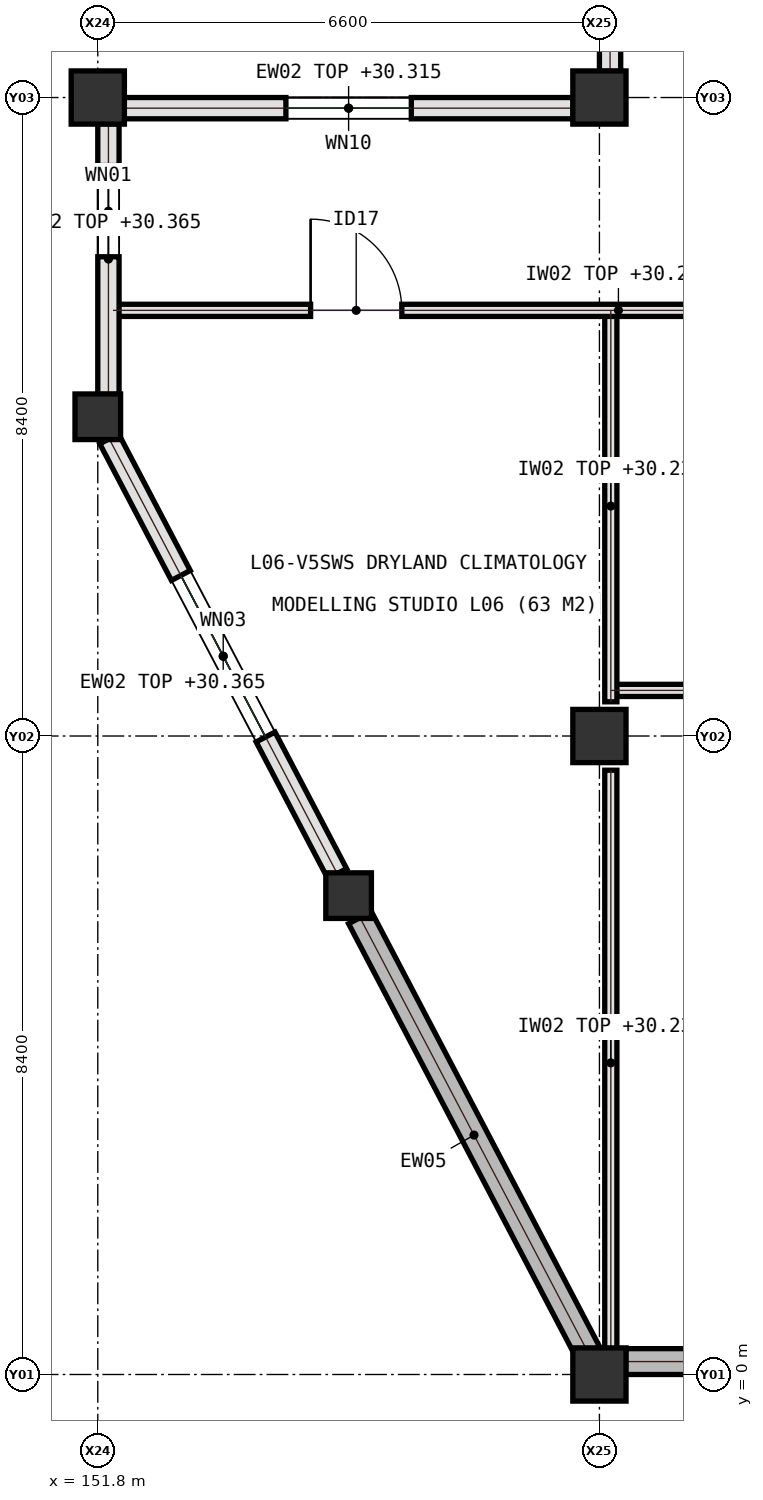
"""IFC4 building model, lengths in metres.
Left out: names, types, materials, properties, quantities, classifications, styles, units other than length and angle.
Written with IfcOpenShell. Run it as: python <this file> out.ifc"""

import sys

from ifc_helpers import new_model, si_unit, direction, frame, frame_2d, origin, origin_2d, place, context, subcontext, project, spatial, rectangle, extrude, element, fill, save


model = new_model("IFC4")
c1 = context("Model", 3, precision=1e-05, world=origin(), true_north=direction((0.0, 1.0)))
c2 = subcontext(c1, "Body", "Model", "MODEL_VIEW")
j1 = project(units=[si_unit("LENGTHUNIT", "METRE"), si_unit("PLANEANGLEUNIT", "RADIAN")], contexts=[c1])
p1 = place(None, origin())
s1 = spatial("IfcSite", under=j1, at=p1, CompositionType="ELEMENT")
p2 = place(p1, origin())
s2 = spatial("IfcBuilding", under=s1, at=p2, CompositionType="ELEMENT")
p3 = place(p2, frame((0.0, 0.0, 27.0)))
s3 = spatial("IfcBuildingStorey", under=s2, at=p3, CompositionType="ELEMENT", Elevation=27.0)
for number, where, z_axis, x_axis in (
    (1, (151.8, 16.8, 0.0), (0.0, 0.0, 1.0), (1.0, 0.0, 0.0)),
    (2, (158.4, 0.0, 0.0), (0.0, 0.0, 1.0), (1.0, 0.0, 0.0)),
    (3, (158.4, 8.4, 0.0), (0.0, 0.0, 1.0), (1.0, 0.0, 0.0)),
    (4, (158.4, 16.8, 0.0), (0.0, 0.0, 1.0), (1.0, 0.0, 0.0)),
):
    element("IfcColumn", number, at=place(p3, frame(where, z_axis=z_axis, x_axis=x_axis)), inside=s3, PredefinedType="COLUMN", context=c2, shape_type="SweptSolid", body=[
        extrude(rectangle(XDim=0.7, YDim=0.7, at=origin_2d()), origin(), (0.0, 0.0, 1.0), 4.2),
    ])
for number, where, z_axis, x_axis in (
    (5, (151.8, 12.6, 0.0), (0.0, 0.0, 1.0), (1.0, 0.0, 0.0)),
    (6, (155.1, 6.3, 0.0), (0.0, 0.0, 1.0), (1.0, 0.0, 0.0)),
):
    element("IfcColumn", number, at=place(p3, frame(where, z_axis=z_axis, x_axis=x_axis)), inside=s3, PredefinedType="COLUMN", context=c2, shape_type="SweptSolid", body=[
        extrude(rectangle(XDim=0.6, YDim=0.6, at=origin_2d()), origin(), (0.0, 0.0, 1.0), 4.2),
    ])
p4 = place(p3, frame((158.55, 9.0, 0.0), z_axis=(0.0, 0.0, 1.0), x_axis=(1.0, 0.0, 0.0)))
e7 = element("IfcWall", 7, at=p4, inside=s3, PredefinedType="PARTITIONING", context=c2, shape_type="SweptSolid", body=[
    extrude(rectangle(XDim=6.75, YDim=0.16, at=frame_2d((3.375, 0.0))), origin(), (0.0, 0.0, 1.0), 3.23),
])
p5 = place(p4, frame((2.5, 0.0, 0.0)))
e8 = element("IfcOpeningElement", 8, at=p5, cuts=e7, PredefinedType="OPENING", context=c2, shape_type="SweptSolid", body=[
    extrude(rectangle(XDim=1.05, YDim=2.15, at=frame_2d((0.525, 1.075))), frame((0.0, 0.09, 0.0), z_axis=(0.0, -1.0, 0.0), x_axis=(1.0, 0.0, 0.0)), (0.0, 0.0, 1.0), 0.18),
])
p6 = place(p3, frame((158.55, 0.25, 0.0), z_axis=(0.0, 0.0, 1.0), x_axis=(0.0, 1.0, 0.0)))
e9 = element("IfcWall", 9, at=p6, inside=s3, PredefinedType="PARTITIONING", context=c2, shape_type="SweptSolid", body=[
    extrude(rectangle(XDim=7.7, YDim=0.16, at=frame_2d((3.85, 0.0))), origin(), (0.0, 0.0, 1.0), 3.23),
])
p7 = place(p3, frame((158.55, 8.85, 0.0), z_axis=(0.0, 0.0, 1.0), x_axis=(0.0, 1.0, 0.0)))
e10 = element("IfcWall", 10, at=p7, inside=s3, PredefinedType="PARTITIONING", context=c2, shape_type="SweptSolid", body=[
    extrude(rectangle(XDim=5.15, YDim=0.16, at=frame_2d((2.575, 0.0))), origin(), (0.0, 0.0, 1.0), 3.23),
])
p8 = place(p3, frame((152.0, 14.0, 0.0), z_axis=(0.0, 0.0, 1.0), x_axis=(1.0, 0.0, 0.0)))
e11 = element("IfcWall", 11, at=p8, inside=s3, PredefinedType="PARTITIONING", context=c2, shape_type="SweptSolid", body=[
    extrude(rectangle(XDim=13.3, YDim=0.16, at=frame_2d((6.65, 0.0))), origin(), (0.0, 0.0, 1.0), 3.23),
])
p9 = place(p8, frame((2.6, 0.0, 0.0)))
e12 = element("IfcOpeningElement", 12, at=p9, cuts=e11, PredefinedType="OPENING", context=c2, shape_type="SweptSolid", body=[
    extrude(rectangle(XDim=1.2, YDim=2.22, at=frame_2d((0.6, 1.11))), frame((0.0, 0.09, 0.0), z_axis=(0.0, -1.0, 0.0), x_axis=(1.0, 0.0, 0.0)), (0.0, 0.0, 1.0), 0.18),
])
p10 = place(p8, frame((9.8, 0.0, 0.0)))
e13 = element("IfcOpeningElement", 13, at=p10, cuts=e11, PredefinedType="OPENING", context=c2, shape_type="SweptSolid", body=[
    extrude(rectangle(XDim=1.2, YDim=2.22, at=frame_2d((0.6, 1.11))), frame((0.0, 0.09, 0.0), z_axis=(0.0, -1.0, 0.0), x_axis=(1.0, 0.0, 0.0)), (0.0, 0.0, 1.0), 0.18),
])
p11 = place(p3, frame((158.055, 16.66, 0.0), z_axis=(0.0, 0.0, 1.0), x_axis=(-1.0, 0.0, 0.0)))
e14 = element("IfcWall", 14, at=p11, inside=s3, PredefinedType="SOLIDWALL", context=c2, shape_type="SweptSolid", body=[
    extrude(rectangle(XDim=5.91, YDim=0.28, at=frame_2d((2.955, 0.0))), origin(), (0.0, 0.0, 1.0), 3.315),
])
p12 = place(p11, frame((2.13, 0.0, 0.95)))
e15 = element("IfcOpeningElement", 15, at=p12, cuts=e14, PredefinedType="OPENING", context=c2, shape_type="SweptSolid", body=[
    extrude(rectangle(XDim=1.65, YDim=1.55, at=frame_2d((0.825, 0.775))), frame((0.0, 0.15, 0.0), z_axis=(0.0, -1.0, 0.0), x_axis=(1.0, 0.0, 0.0)), (0.0, 0.0, 1.0), 0.3),
])
p13 = place(p3, frame((158.745, 0.17, 0.0), z_axis=(0.0, 0.0, 1.0), x_axis=(1.0, 0.0, 0.0)))
e16 = element("IfcWall", 16, at=p13, inside=s3, PredefinedType="SHEAR", context=c2, shape_type="SweptSolid", body=[
    extrude(rectangle(XDim=5.91, YDim=0.34, at=frame_2d((2.955, 0.0))), origin(), (0.0, 0.0, 1.0), 3.98),
])
p14 = place(p3, frame((158.54, 24.855, 0.0), z_axis=(0.0, 0.0, 1.0), x_axis=(0.0, -1.0, 0.0)))
e17 = element("IfcWall", 17, at=p14, inside=s3, PredefinedType="SOLIDWALL", context=c2, shape_type="SweptSolid", body=[
    extrude(rectangle(XDim=7.71, YDim=0.28, at=frame_2d((3.855, 0.0))), origin(), (0.0, 0.0, 1.0), 3.365),
])
p15 = place(p14, frame((3.28, 0.0, 0.95)))
e18 = element("IfcOpeningElement", 18, at=p15, cuts=e17, PredefinedType="OPENING", context=c2, shape_type="SweptSolid", body=[
    extrude(rectangle(XDim=1.15, YDim=1.6, at=frame_2d((0.575, 0.8))), frame((0.0, 0.15, 0.0), z_axis=(0.0, -1.0, 0.0), x_axis=(1.0, 0.0, 0.0)), (0.0, 0.0, 1.0), 0.3),
])
p16 = place(p3, frame((151.94, 16.455, 0.0), z_axis=(0.0, 0.0, 1.0), x_axis=(0.0, -1.0, 0.0)))
e19 = element("IfcWall", 19, at=p16, inside=s3, PredefinedType="SOLIDWALL", context=c2, shape_type="SweptSolid", body=[
    extrude(rectangle(XDim=3.56, YDim=0.28, at=frame_2d((1.78, 0.0))), origin(), (0.0, 0.0, 1.0), 3.365),
])
p17 = place(p16, frame((0.55, 0.0, 0.95)))
e20 = element("IfcOpeningElement", 20, at=p17, cuts=e19, PredefinedType="OPENING", context=c2, shape_type="SweptSolid", body=[
    extrude(rectangle(XDim=1.2, YDim=1.5, at=frame_2d((0.6, 0.75))), frame((0.0, 0.15, 0.0), z_axis=(0.0, -1.0, 0.0), x_axis=(1.0, 0.0, 0.0)), (0.0, 0.0, 1.0), 0.3),
])
p18 = place(p3, frame((151.95, 12.31, 0.0), z_axis=(0.0, 0.0, 1.0), x_axis=(0.464471613901, -0.885588007981, 0.0)))
e21 = element("IfcWall", 21, at=p18, inside=s3, PredefinedType="SOLIDWALL", context=c2, shape_type="SweptSolid", body=[
    extrude(rectangle(XDim=6.459, YDim=0.28, at=frame_2d((3.229, 0.0))), origin(), (0.0, 0.0, 1.0), 3.365),
])
p19 = place(p18, frame((2.03, 0.0, 0.95)))
e22 = element("IfcOpeningElement", 22, at=p19, cuts=e21, PredefinedType="OPENING", context=c2, shape_type="SweptSolid", body=[
    extrude(rectangle(XDim=2.4, YDim=1.6, at=frame_2d((1.2, 0.8))), frame((0.0, 0.15, 0.0), z_axis=(0.0, -1.0, 0.0), x_axis=(1.0, 0.0, 0.0)), (0.0, 0.0, 1.0), 0.3),
])
p20 = place(p3, frame((155.25, 6.01, 0.0), z_axis=(0.0, 0.0, 1.0), x_axis=(0.464471613901, -0.885588007981, 0.0)))
e23 = element("IfcWall", 23, at=p20, inside=s3, PredefinedType="SHEAR", context=c2, shape_type="SweptSolid", body=[
    extrude(rectangle(XDim=6.459, YDim=0.34, at=frame_2d((3.229, 0.0))), origin(), (0.0, 0.0, 1.0), 3.98),
])
p21 = place(p9, origin())
e24 = element("IfcDoor", 24, at=p21, inside=s3, OperationType="SINGLE_SWING_LEFT", PredefinedType="DOOR", context=c2, shape_type="SweptSolid", body=[
    extrude(rectangle(XDim=1.2, YDim=2.22, at=frame_2d((0.6, 1.11))), frame((0.0, 0.025, 0.0), z_axis=(0.0, -1.0, 0.0), x_axis=(1.0, 0.0, 0.0)), (0.0, 0.0, 1.0), 0.05),
])
fill(e12, e24)
p22 = place(p12, origin())
e25 = element("IfcWindow", 25, at=p22, inside=s3, PartitioningType="SINGLE_PANEL", PredefinedType="WINDOW", context=c2, shape_type="SweptSolid", body=[
    extrude(rectangle(XDim=1.65, YDim=1.55, at=frame_2d((0.825, 0.775))), frame((0.0, 0.03, 0.0), z_axis=(0.0, -1.0, 0.0), x_axis=(1.0, 0.0, 0.0)), (0.0, 0.0, 1.0), 0.06),
])
fill(e15, e25)
p23 = place(p17, origin())
e26 = element("IfcWindow", 26, at=p23, inside=s3, PartitioningType="SINGLE_PANEL", PredefinedType="WINDOW", context=c2, shape_type="SweptSolid", body=[
    extrude(rectangle(XDim=1.2, YDim=1.5, at=frame_2d((0.6, 0.75))), frame((0.0, 0.03, 0.0), z_axis=(0.0, -1.0, 0.0), x_axis=(1.0, 0.0, 0.0)), (0.0, 0.0, 1.0), 0.06),
])
fill(e20, e26)
p24 = place(p19, origin())
e27 = element("IfcWindow", 27, at=p24, inside=s3, PartitioningType="SINGLE_PANEL", PredefinedType="WINDOW", context=c2, shape_type="SweptSolid", body=[
    extrude(rectangle(XDim=2.4, YDim=1.6, at=frame_2d((1.2, 0.8))), frame((0.0, 0.03, 0.0), z_axis=(0.0, -1.0, 0.0), x_axis=(1.0, 0.0, 0.0)), (0.0, 0.0, 1.0), 0.06),
])
fill(e22, e27)
save(model, sys.argv[1])
